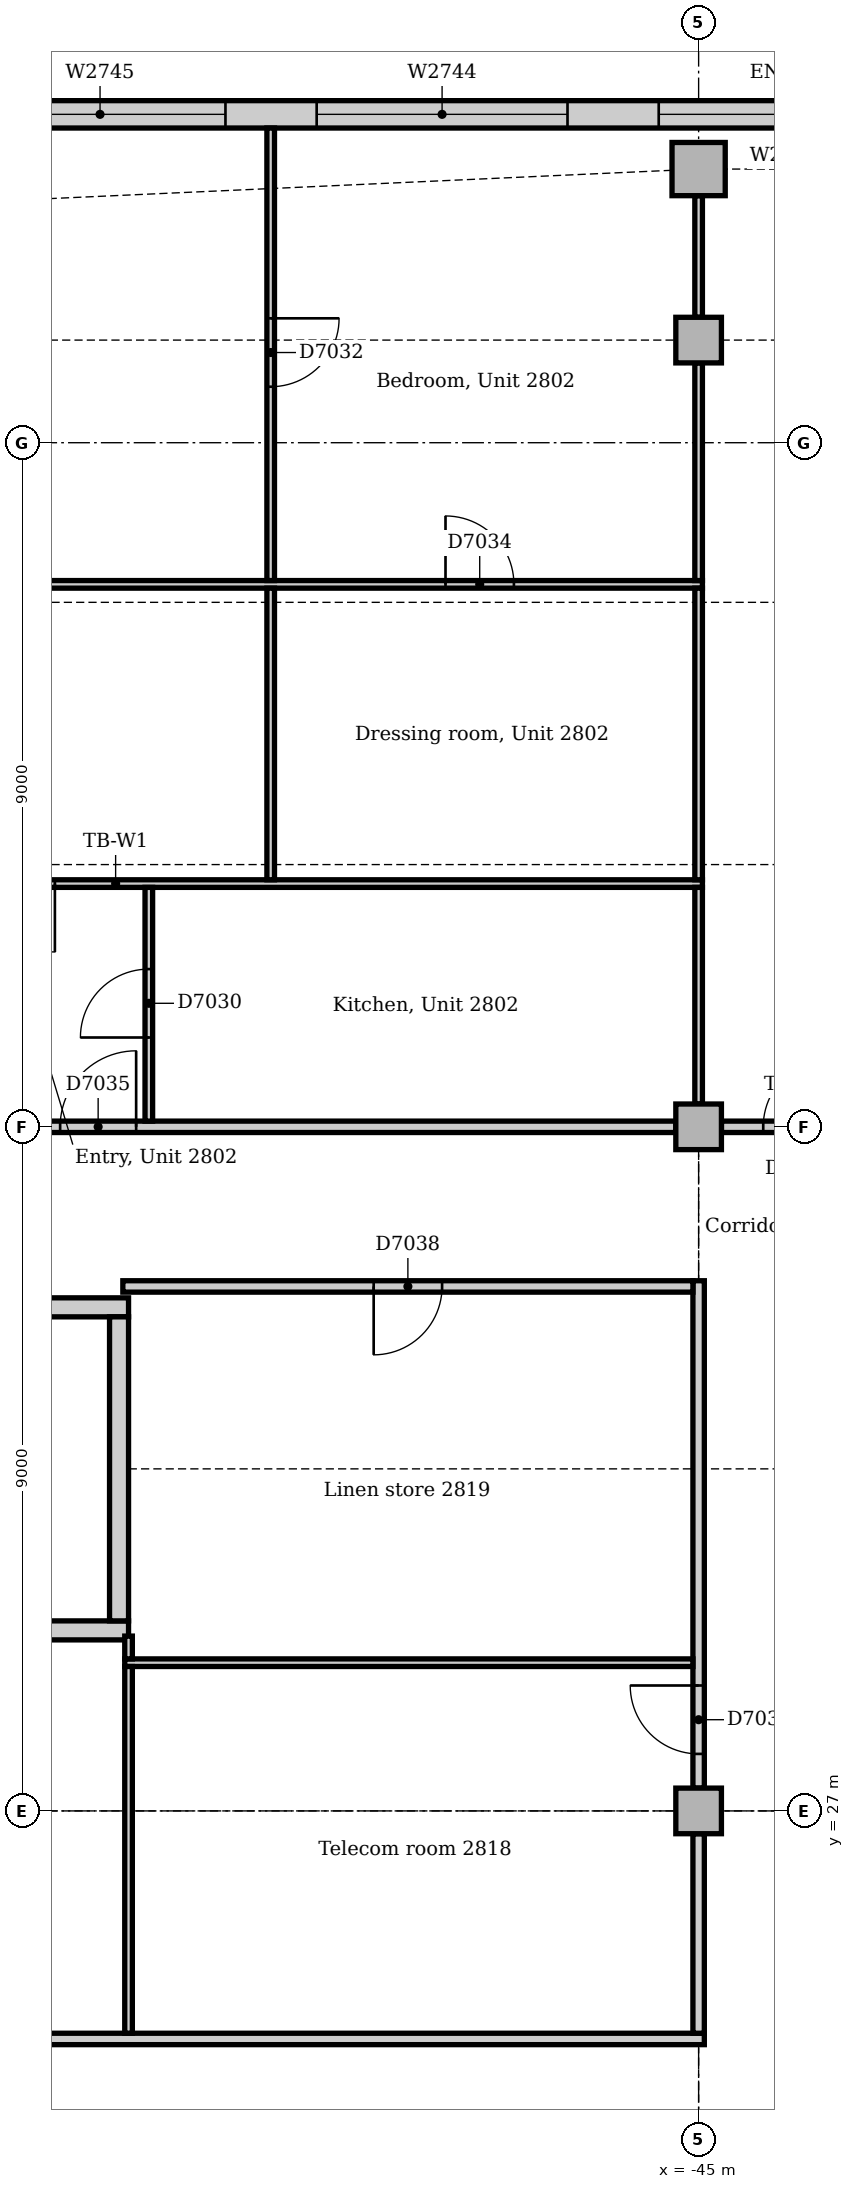
"""IFC4 building model, lengths in metres.
Left out: names, types, materials, properties, quantities, classifications, styles, units other than length and angle.
Written with IfcOpenShell. Run it as: python <this file> out.ifc"""

import sys

from ifc_helpers import new_model, si_unit, direction, frame, frame_2d, origin, origin_2d, place, context, subcontext, project, spatial, rectangle, extrude, element, fill, save


model = new_model("IFC4")
c1 = context("Model", 3, precision=1e-05, world=origin(), true_north=direction((0.0, 1.0)))
c2 = subcontext(c1, "Body", "Model", "MODEL_VIEW")
j1 = project(units=[si_unit("LENGTHUNIT", "METRE"), si_unit("PLANEANGLEUNIT", "RADIAN")], contexts=[c1])
p1 = place(None, origin())
s1 = spatial("IfcSite", under=j1, at=p1, CompositionType="ELEMENT")
p2 = place(p1, origin())
s2 = spatial("IfcBuilding", under=s1, at=p2, CompositionType="ELEMENT")
p3 = place(p2, frame((0.0, 0.0, 120.0)))
s3 = spatial("IfcBuildingStorey", under=s2, at=p3, CompositionType="ELEMENT", Elevation=120.0)
p4 = place(p3, frame((-60.0, 29.375, 0.0), z_axis=(0.0, 0.0, 1.0), x_axis=(1.0, 0.0, 0.0)))
e1 = element("IfcWall", 1, at=p4, inside=s3, PredefinedType="SOLIDWALL", context=c2, shape_type="SweptSolid", body=[
    extrude(rectangle(XDim=7.5, YDim=0.25, at=frame_2d((3.75, 0.0))), origin(), (0.0, 0.0, 1.0), 4.0),
])
p5 = place(p3, frame((-52.5, 33.625, 0.0), z_axis=(0.0, 0.0, 1.0), x_axis=(-1.0, 0.0, 0.0)))
e2 = element("IfcWall", 2, at=p5, inside=s3, PredefinedType="SOLIDWALL", context=c2, shape_type="SweptSolid", body=[
    extrude(rectangle(XDim=7.5, YDim=0.25, at=frame_2d((3.75, 0.0))), origin(), (0.0, 0.0, 1.0), 4.0),
])
p6 = place(p5, frame((6.0, 0.0, 0.0)))
e3 = element("IfcOpeningElement", 3, at=p6, cuts=e2, PredefinedType="OPENING", context=c2, shape_type="SweptSolid", body=[
    extrude(rectangle(XDim=1.0, YDim=2.1, at=frame_2d((0.5, 1.05))), frame((0.0, 0.135, 0.0), z_axis=(0.0, -1.0, 0.0), x_axis=(1.0, 0.0, 0.0)), (0.0, 0.0, 1.0), 0.27),
])
p7 = place(p3, frame((-52.625, 29.5, 0.0), z_axis=(0.0, 0.0, 1.0), x_axis=(0.0, 1.0, 0.0)))
e4 = element("IfcWall", 4, at=p7, inside=s3, PredefinedType="SOLIDWALL", context=c2, shape_type="SweptSolid", body=[
    extrude(rectangle(XDim=4.0, YDim=0.25, at=frame_2d((2.0, 0.0))), origin(), (0.0, 0.0, 1.0), 4.0),
])
p8 = place(p3, frame((-45.0, 48.6, 0.0), z_axis=(0.0, 0.0, 1.0), x_axis=(1.0, 0.0, 0.0)))
e5 = element("IfcColumn", 5, at=p8, inside=s3, PredefinedType="COLUMN", context=c2, shape_type="SweptSolid", body=[
    extrude(rectangle(XDim=0.7, YDim=0.7, at=origin_2d()), origin(), (0.0, 0.0, 1.0), 3.85),
])
for number, where, z_axis, x_axis in (
    (6, (-45.0, 27.0, 0.0), (0.0, 0.0, 1.0), (1.0, 0.0, 0.0)),
    (7, (-45.0, 36.0, 0.0), (0.0, 0.0, 1.0), (1.0, 0.0, 0.0)),
    (8, (-45.0, 46.35, 0.0), (0.0, 0.0, 1.0), (1.0, 0.0, 0.0)),
):
    element("IfcColumn", number, at=place(p3, frame(where, z_axis=z_axis, x_axis=x_axis)), inside=s3, PredefinedType="COLUMN", context=c2, shape_type="SweptSolid", body=[
        extrude(rectangle(XDim=0.6, YDim=0.6, at=origin_2d()), origin(), (0.0, 0.0, 1.0), 3.85),
    ])
p9 = place(p3, frame((-31.243, 49.32, 0.0), z_axis=(0.0, 0.0, 1.0), x_axis=(-1.0, 0.0, 0.0)))
e9 = element("IfcWall", 9, at=p9, inside=s3, PredefinedType="STANDARD", context=c2, shape_type="SweptSolid", body=[
    extrude(rectangle(XDim=25.265, YDim=0.36, at=frame_2d((12.632, 0.0))), origin(), (0.0, 0.0, 1.0), 3.85),
])
p10 = place(p9, frame((1.982, 0.0, 0.9)))
e10 = element("IfcOpeningElement", 10, at=p10, cuts=e9, PredefinedType="OPENING", context=c2, shape_type="SweptSolid", body=[
    extrude(rectangle(XDim=3.3, YDim=1.6, at=frame_2d((1.65, 0.8))), frame((0.0, 0.19, 0.0), z_axis=(0.0, -1.0, 0.0), x_axis=(1.0, 0.0, 0.0)), (0.0, 0.0, 1.0), 0.38),
])
p11 = place(p9, frame((6.482, 0.0, 0.9)))
e11 = element("IfcOpeningElement", 11, at=p11, cuts=e9, PredefinedType="OPENING", context=c2, shape_type="SweptSolid", body=[
    extrude(rectangle(XDim=3.3, YDim=1.6, at=frame_2d((1.65, 0.8))), frame((0.0, 0.19, 0.0), z_axis=(0.0, -1.0, 0.0), x_axis=(1.0, 0.0, 0.0)), (0.0, 0.0, 1.0), 0.38),
])
p12 = place(p9, frame((10.982, 0.0, 0.9)))
e12 = element("IfcOpeningElement", 12, at=p12, cuts=e9, PredefinedType="OPENING", context=c2, shape_type="SweptSolid", body=[
    extrude(rectangle(XDim=3.3, YDim=1.6, at=frame_2d((1.65, 0.8))), frame((0.0, 0.19, 0.0), z_axis=(0.0, -1.0, 0.0), x_axis=(1.0, 0.0, 0.0)), (0.0, 0.0, 1.0), 0.38),
])
p13 = place(p9, frame((15.482, 0.0, 0.9)))
e13 = element("IfcOpeningElement", 13, at=p13, cuts=e9, PredefinedType="OPENING", context=c2, shape_type="SweptSolid", body=[
    extrude(rectangle(XDim=3.3, YDim=1.6, at=frame_2d((1.65, 0.8))), frame((0.0, 0.19, 0.0), z_axis=(0.0, -1.0, 0.0), x_axis=(1.0, 0.0, 0.0)), (0.0, 0.0, 1.0), 0.38),
])
p14 = place(p9, frame((19.982, 0.0, 0.9)))
e14 = element("IfcOpeningElement", 14, at=p14, cuts=e9, PredefinedType="OPENING", context=c2, shape_type="SweptSolid", body=[
    extrude(rectangle(XDim=3.3, YDim=1.6, at=frame_2d((1.65, 0.8))), frame((0.0, 0.19, 0.0), z_axis=(0.0, -1.0, 0.0), x_axis=(1.0, 0.0, 0.0)), (0.0, 0.0, 1.0), 0.38),
])
p15 = place(p3, frame((-44.7, 36.0, 0.0), z_axis=(0.0, 0.0, 1.0), x_axis=(1.0, 0.0, 0.0)))
e15 = element("IfcWall", 15, at=p15, inside=s3, PredefinedType="PARTITIONING", context=c2, shape_type="SweptSolid", body=[
    extrude(rectangle(XDim=1.975, YDim=0.15, at=frame_2d((0.988, 0.0))), origin(), (0.0, 0.0, 1.0), 3.602),
])
p16 = place(p15, frame((0.55, 0.0, 0.0)))
e16 = element("IfcOpeningElement", 16, at=p16, cuts=e15, PredefinedType="OPENING", context=c2, shape_type="SweptSolid", body=[
    extrude(rectangle(XDim=0.9, YDim=2.1, at=frame_2d((0.45, 1.05))), frame((0.0, 0.085, 0.0), z_axis=(0.0, -1.0, 0.0), x_axis=(1.0, 0.0, 0.0)), (0.0, 0.0, 1.0), 0.17),
])
p17 = place(p3, frame((-53.7, 36.0, 0.0), z_axis=(0.0, 0.0, 1.0), x_axis=(1.0, 0.0, 0.0)))
e17 = element("IfcWall", 17, at=p17, inside=s3, PredefinedType="PARTITIONING", context=c2, shape_type="SweptSolid", body=[
    extrude(rectangle(XDim=8.4, YDim=0.15, at=frame_2d((4.2, 0.0))), origin(), (0.0, 0.0, 1.0), 3.262),
])
p18 = place(p17, frame((0.3, 0.0, 0.0)))
e18 = element("IfcOpeningElement", 18, at=p18, cuts=e17, PredefinedType="OPENING", context=c2, shape_type="SweptSolid", body=[
    extrude(rectangle(XDim=1.0, YDim=2.1, at=frame_2d((0.5, 1.05))), frame((0.0, 0.085, 0.0), z_axis=(0.0, -1.0, 0.0), x_axis=(1.0, 0.0, 0.0)), (0.0, 0.0, 1.0), 0.17),
])
p19 = place(p3, frame((-60.075, 24.0, 0.0), z_axis=(0.0, 0.0, 1.0), x_axis=(1.0, 0.0, 0.0)))
e19 = element("IfcWall", 19, at=p19, inside=s3, PredefinedType="PARTITIONING", context=c2, shape_type="SweptSolid", body=[
    extrude(rectangle(XDim=15.15, YDim=0.15, at=frame_2d((7.575, 0.0))), origin(), (0.0, 0.0, 1.0), 3.85),
])
p20 = place(p19, frame((3.4, 0.0, 0.0)))
e20 = element("IfcOpeningElement", 20, at=p20, cuts=e19, PredefinedType="OPENING", context=c2, shape_type="SweptSolid", body=[
    extrude(rectangle(XDim=0.9, YDim=2.1, at=frame_2d((0.45, 1.05))), frame((0.0, 0.085, 0.0), z_axis=(0.0, -1.0, 0.0), x_axis=(1.0, 0.0, 0.0)), (0.0, 0.0, 1.0), 0.17),
])
p21 = place(p3, frame((-45.0, 24.075, 0.0), z_axis=(0.0, 0.0, 1.0), x_axis=(0.0, 1.0, 0.0)))
e21 = element("IfcWall", 21, at=p21, inside=s3, PredefinedType="PARTITIONING", context=c2, shape_type="SweptSolid", body=[
    extrude(rectangle(XDim=2.625, YDim=0.15, at=frame_2d((1.312, 0.0))), origin(), (0.0, 0.0, 1.0), 3.362),
])
p22 = place(p3, frame((-45.0, 27.3, 0.0), z_axis=(0.0, 0.0, 1.0), x_axis=(0.0, 1.0, 0.0)))
e22 = element("IfcWall", 22, at=p22, inside=s3, PredefinedType="PARTITIONING", context=c2, shape_type="SweptSolid", body=[
    extrude(rectangle(XDim=6.675, YDim=0.15, at=frame_2d((3.337, 0.0))), origin(), (0.0, 0.0, 1.0), 3.362),
])
p23 = place(p22, frame((0.45, 0.0, 0.0)))
e23 = element("IfcOpeningElement", 23, at=p23, cuts=e22, PredefinedType="OPENING", context=c2, shape_type="SweptSolid", body=[
    extrude(rectangle(XDim=0.9, YDim=2.1, at=frame_2d((0.45, 1.05))), frame((0.0, 0.085, 0.0), z_axis=(0.0, -1.0, 0.0), x_axis=(1.0, 0.0, 0.0)), (0.0, 0.0, 1.0), 0.17),
])
p24 = place(p3, frame((-52.575, 33.9, 0.0), z_axis=(0.0, 0.0, 1.0), x_axis=(1.0, 0.0, 0.0)))
e24 = element("IfcWall", 24, at=p24, inside=s3, PredefinedType="PARTITIONING", context=c2, shape_type="SweptSolid", body=[
    extrude(rectangle(XDim=7.5, YDim=0.15, at=frame_2d((3.75, 0.0))), origin(), (0.0, 0.0, 1.0), 3.85),
])
p25 = place(p24, frame((3.3, 0.0, 0.0)))
e25 = element("IfcOpeningElement", 25, at=p25, cuts=e24, PredefinedType="OPENING", context=c2, shape_type="SweptSolid", body=[
    extrude(rectangle(XDim=0.9, YDim=2.1, at=frame_2d((0.45, 1.05))), frame((0.0, 0.085, 0.0), z_axis=(0.0, -1.0, 0.0), x_axis=(1.0, 0.0, 0.0)), (0.0, 0.0, 1.0), 0.17),
])
p26 = place(p3, frame((-60.39, 39.2, 0.0), z_axis=(0.0, 0.0, 1.0), x_axis=(1.0, 0.0, 0.0)))
e26 = element("IfcWall", 26, at=p26, inside=s3, PredefinedType="PARTITIONING", context=c2, shape_type="SweptSolid", body=[
    extrude(rectangle(XDim=15.44, YDim=0.1, at=frame_2d((7.72, 0.0))), origin(), (0.0, 0.0, 1.0), 3.85),
])
p27 = place(p26, frame((6.021, 0.0, 0.0)))
e27 = element("IfcOpeningElement", 27, at=p27, cuts=e26, PredefinedType="OPENING", context=c2, shape_type="SweptSolid", body=[
    extrude(rectangle(XDim=0.9, YDim=2.1, at=frame_2d((0.45, 1.05))), frame((0.0, 0.06, 0.0), z_axis=(0.0, -1.0, 0.0), x_axis=(1.0, 0.0, 0.0)), (0.0, 0.0, 1.0), 0.12),
])
p28 = place(p3, frame((-60.39, 43.136, 0.0), z_axis=(0.0, 0.0, 1.0), x_axis=(1.0, 0.0, 0.0)))
e28 = element("IfcWall", 28, at=p28, inside=s3, PredefinedType="PARTITIONING", context=c2, shape_type="SweptSolid", body=[
    extrude(rectangle(XDim=15.44, YDim=0.1, at=frame_2d((7.72, 0.0))), origin(), (0.0, 0.0, 1.0), 3.85),
])
p29 = place(p28, frame((4.5, 0.0, 0.0)))
e29 = element("IfcOpeningElement", 29, at=p29, cuts=e28, PredefinedType="OPENING", context=c2, shape_type="SweptSolid", body=[
    extrude(rectangle(XDim=0.9, YDim=2.1, at=frame_2d((0.45, 1.05))), frame((0.0, 0.06, 0.0), z_axis=(0.0, -1.0, 0.0), x_axis=(1.0, 0.0, 0.0)), (0.0, 0.0, 1.0), 0.12),
])
p30 = place(p28, frame((12.06, 0.0, 0.0)))
e30 = element("IfcOpeningElement", 30, at=p30, cuts=e28, PredefinedType="OPENING", context=c2, shape_type="SweptSolid", body=[
    extrude(rectangle(XDim=0.9, YDim=2.1, at=frame_2d((0.45, 1.05))), frame((0.0, 0.06, 0.0), z_axis=(0.0, -1.0, 0.0), x_axis=(1.0, 0.0, 0.0)), (0.0, 0.0, 1.0), 0.12),
])
p31 = place(p3, frame((-45.0, 43.187, 0.0), z_axis=(0.0, 0.0, 1.0), x_axis=(0.0, 1.0, 0.0)))
e31 = element("IfcWall", 31, at=p31, inside=s3, PredefinedType="PARTITIONING", context=c2, shape_type="SweptSolid", body=[
    extrude(rectangle(XDim=2.864, YDim=0.1, at=frame_2d((1.432, 0.0))), origin(), (0.0, 0.0, 1.0), 3.362),
])
p32 = place(p3, frame((-45.0, 39.25, 0.0), z_axis=(0.0, 0.0, 1.0), x_axis=(0.0, 1.0, 0.0)))
e32 = element("IfcWall", 32, at=p32, inside=s3, PredefinedType="PARTITIONING", context=c2, shape_type="SweptSolid", body=[
    extrude(rectangle(XDim=3.837, YDim=0.1, at=frame_2d((1.918, 0.0))), origin(), (0.0, 0.0, 1.0), 3.362),
])
p33 = place(p3, frame((-45.0, 36.3, 0.0), z_axis=(0.0, 0.0, 1.0), x_axis=(0.0, 1.0, 0.0)))
e33 = element("IfcWall", 33, at=p33, inside=s3, PredefinedType="PARTITIONING", context=c2, shape_type="SweptSolid", body=[
    extrude(rectangle(XDim=2.85, YDim=0.1, at=frame_2d((1.425, 0.0))), origin(), (0.0, 0.0, 1.0), 3.362),
])
p34 = place(p3, frame((-45.0, 46.65, 0.0), z_axis=(0.0, 0.0, 1.0), x_axis=(0.0, 1.0, 0.0)))
e34 = element("IfcWall", 34, at=p34, inside=s3, PredefinedType="PARTITIONING", context=c2, shape_type="SweptSolid", body=[
    extrude(rectangle(XDim=1.6, YDim=0.1, at=frame_2d((0.8, 0.0))), origin(), (0.0, 0.0, 1.0), 3.652),
])
p35 = place(p3, frame((-50.63, 39.25, 0.0), z_axis=(0.0, 0.0, 1.0), x_axis=(0.0, 1.0, 0.0)))
e35 = element("IfcWall", 35, at=p35, inside=s3, PredefinedType="PARTITIONING", context=c2, shape_type="SweptSolid", body=[
    extrude(rectangle(XDim=3.837, YDim=0.1, at=frame_2d((1.918, 0.0))), origin(), (0.0, 0.0, 1.0), 3.85),
])
p36 = place(p3, frame((-50.63, 43.187, 0.0), z_axis=(0.0, 0.0, 1.0), x_axis=(0.0, 1.0, 0.0)))
e36 = element("IfcWall", 36, at=p36, inside=s3, PredefinedType="PARTITIONING", context=c2, shape_type="SweptSolid", body=[
    extrude(rectangle(XDim=5.954, YDim=0.1, at=frame_2d((2.977, 0.0))), origin(), (0.0, 0.0, 1.0), 3.85),
])
p37 = place(p36, frame((2.55, 0.0, 0.0)))
e37 = element("IfcOpeningElement", 37, at=p37, cuts=e36, PredefinedType="OPENING", context=c2, shape_type="SweptSolid", body=[
    extrude(rectangle(XDim=0.9, YDim=2.1, at=frame_2d((0.45, 1.05))), frame((0.0, 0.06, 0.0), z_axis=(0.0, -1.0, 0.0), x_axis=(1.0, 0.0, 0.0)), (0.0, 0.0, 1.0), 0.12),
])
p38 = place(p3, frame((-52.55, 28.95, 0.0), z_axis=(0.0, 0.0, 1.0), x_axis=(1.0, 0.0, 0.0)))
e38 = element("IfcWall", 38, at=p38, inside=s3, PredefinedType="PARTITIONING", context=c2, shape_type="SweptSolid", body=[
    extrude(rectangle(XDim=7.475, YDim=0.1, at=frame_2d((3.737, 0.0))), origin(), (0.0, 0.0, 1.0), 3.85),
])
p39 = place(p3, frame((-52.5, 29.0, 0.0), z_axis=(0.0, 0.0, 1.0), x_axis=(0.0, 1.0, 0.0)))
e39 = element("IfcWall", 39, at=p39, inside=s3, PredefinedType="PARTITIONING", context=c2, shape_type="SweptSolid", body=[
    extrude(rectangle(XDim=0.3, YDim=0.1, at=frame_2d((0.15, 0.0))), origin(), (0.0, 0.0, 1.0), 3.85),
])
p40 = place(p3, frame((-52.5, 24.075, 0.0), z_axis=(0.0, 0.0, 1.0), x_axis=(0.0, 1.0, 0.0)))
e40 = element("IfcWall", 40, at=p40, inside=s3, PredefinedType="PARTITIONING", context=c2, shape_type="SweptSolid", body=[
    extrude(rectangle(XDim=4.825, YDim=0.1, at=frame_2d((2.413, 0.0))), origin(), (0.0, 0.0, 1.0), 3.85),
])
p41 = place(p3, frame((-52.233, 36.075, 0.0), z_axis=(0.0, 0.0, 1.0), x_axis=(0.0, 1.0, 0.0)))
e41 = element("IfcWall", 41, at=p41, inside=s3, PredefinedType="PARTITIONING", context=c2, shape_type="SweptSolid", body=[
    extrude(rectangle(XDim=3.075, YDim=0.1, at=frame_2d((1.538, 0.0))), origin(), (0.0, 0.0, 1.0), 3.85),
])
p42 = place(p41, frame((1.1, 0.0, 0.0)))
e42 = element("IfcOpeningElement", 42, at=p42, cuts=e41, PredefinedType="OPENING", context=c2, shape_type="SweptSolid", body=[
    extrude(rectangle(XDim=0.9, YDim=2.1, at=frame_2d((0.45, 1.05))), frame((0.0, 0.06, 0.0), z_axis=(0.0, -1.0, 0.0), x_axis=(1.0, 0.0, 0.0)), (0.0, 0.0, 1.0), 0.12),
])
p43 = place(p12, origin())
e43 = element("IfcWindow", 43, at=p43, inside=s3, PartitioningType="SINGLE_PANEL", PredefinedType="WINDOW", context=c2, shape_type="SweptSolid", body=[
    extrude(rectangle(XDim=3.3, YDim=1.6, at=frame_2d((1.65, 0.8))), frame((0.0, 0.13, 0.0), z_axis=(0.0, -1.0, 0.0), x_axis=(1.0, 0.0, 0.0)), (0.0, 0.0, 1.0), 0.06),
])
fill(e12, e43)
p44 = place(p13, origin())
e44 = element("IfcWindow", 44, at=p44, inside=s3, PartitioningType="SINGLE_PANEL", PredefinedType="WINDOW", context=c2, shape_type="SweptSolid", body=[
    extrude(rectangle(XDim=3.3, YDim=1.6, at=frame_2d((1.65, 0.8))), frame((0.0, 0.13, 0.0), z_axis=(0.0, -1.0, 0.0), x_axis=(1.0, 0.0, 0.0)), (0.0, 0.0, 1.0), 0.06),
])
fill(e13, e44)
p45 = place(p14, origin())
e45 = element("IfcWindow", 45, at=p45, inside=s3, PartitioningType="SINGLE_PANEL", PredefinedType="WINDOW", context=c2, shape_type="SweptSolid", body=[
    extrude(rectangle(XDim=3.3, YDim=1.6, at=frame_2d((1.65, 0.8))), frame((0.0, 0.13, 0.0), z_axis=(0.0, -1.0, 0.0), x_axis=(1.0, 0.0, 0.0)), (0.0, 0.0, 1.0), 0.06),
])
fill(e14, e45)
p46 = place(p16, origin())
e46 = element("IfcDoor", 46, at=p46, inside=s3, OperationType="SINGLE_SWING_RIGHT", PredefinedType="DOOR", context=c2, shape_type="SweptSolid", body=[
    extrude(rectangle(XDim=0.9, YDim=2.1, at=frame_2d((0.45, 1.05))), frame((0.0, 0.025, 0.0), z_axis=(0.0, -1.0, 0.0), x_axis=(1.0, 0.0, 0.0)), (0.0, 0.0, 1.0), 0.05),
])
fill(e16, e46)
p47 = place(p42, origin())
e47 = element("IfcDoor", 47, at=p47, inside=s3, OperationType="SINGLE_SWING_LEFT", PredefinedType="DOOR", context=c2, shape_type="SweptSolid", body=[
    extrude(rectangle(XDim=0.9, YDim=2.1, at=frame_2d((0.45, 1.05))), frame((0.0, 0.025, 0.0), z_axis=(0.0, -1.0, 0.0), x_axis=(1.0, 0.0, 0.0)), (0.0, 0.0, 1.0), 0.05),
])
fill(e42, e47)
p48 = place(p27, frame((0.9, 0.0, 0.0), z_axis=(0.0, 0.0, 1.0), x_axis=(-1.0, 0.0, 0.0)))
e48 = element("IfcDoor", 48, at=p48, inside=s3, OperationType="SINGLE_SWING_LEFT", PredefinedType="DOOR", context=c2, shape_type="SweptSolid", body=[
    extrude(rectangle(XDim=0.9, YDim=2.1, at=frame_2d((0.45, 1.05))), frame((0.0, 0.025, 0.0), z_axis=(0.0, -1.0, 0.0), x_axis=(1.0, 0.0, 0.0)), (0.0, 0.0, 1.0), 0.05),
])
fill(e27, e48)
p49 = place(p37, frame((0.9, 0.0, 0.0), z_axis=(0.0, 0.0, 1.0), x_axis=(-1.0, 0.0, 0.0)))
e49 = element("IfcDoor", 49, at=p49, inside=s3, OperationType="SINGLE_SWING_LEFT", PredefinedType="DOOR", context=c2, shape_type="SweptSolid", body=[
    extrude(rectangle(XDim=0.9, YDim=2.1, at=frame_2d((0.45, 1.05))), frame((0.0, 0.025, 0.0), z_axis=(0.0, -1.0, 0.0), x_axis=(1.0, 0.0, 0.0)), (0.0, 0.0, 1.0), 0.05),
])
fill(e37, e49)
p50 = place(p30, origin())
e50 = element("IfcDoor", 50, at=p50, inside=s3, OperationType="SINGLE_SWING_LEFT", PredefinedType="DOOR", context=c2, shape_type="SweptSolid", body=[
    extrude(rectangle(XDim=0.9, YDim=2.1, at=frame_2d((0.45, 1.05))), frame((0.0, 0.025, 0.0), z_axis=(0.0, -1.0, 0.0), x_axis=(1.0, 0.0, 0.0)), (0.0, 0.0, 1.0), 0.05),
])
fill(e30, e50)
p51 = place(p18, origin())
e51 = element("IfcDoor", 51, at=p51, inside=s3, OperationType="SINGLE_SWING_RIGHT", PredefinedType="DOOR", context=c2, shape_type="SweptSolid", body=[
    extrude(rectangle(XDim=1.0, YDim=2.1, at=frame_2d((0.5, 1.05))), frame((0.0, 0.025, 0.0), z_axis=(0.0, -1.0, 0.0), x_axis=(1.0, 0.0, 0.0)), (0.0, 0.0, 1.0), 0.05),
])
fill(e18, e51)
p52 = place(p23, origin())
e52 = element("IfcDoor", 52, at=p52, inside=s3, OperationType="SINGLE_SWING_RIGHT", PredefinedType="DOOR", context=c2, shape_type="SweptSolid", body=[
    extrude(rectangle(XDim=0.9, YDim=2.1, at=frame_2d((0.45, 1.05))), frame((0.0, 0.025, 0.0), z_axis=(0.0, -1.0, 0.0), x_axis=(1.0, 0.0, 0.0)), (0.0, 0.0, 1.0), 0.05),
])
fill(e23, e52)
p53 = place(p25, frame((0.9, 0.0, 0.0), z_axis=(0.0, 0.0, 1.0), x_axis=(-1.0, 0.0, 0.0)))
e53 = element("IfcDoor", 53, at=p53, inside=s3, OperationType="SINGLE_SWING_RIGHT", PredefinedType="DOOR", context=c2, shape_type="SweptSolid", body=[
    extrude(rectangle(XDim=0.9, YDim=2.1, at=frame_2d((0.45, 1.05))), frame((0.0, 0.025, 0.0), z_axis=(0.0, -1.0, 0.0), x_axis=(1.0, 0.0, 0.0)), (0.0, 0.0, 1.0), 0.05),
])
fill(e25, e53)
save(model, sys.argv[1])
